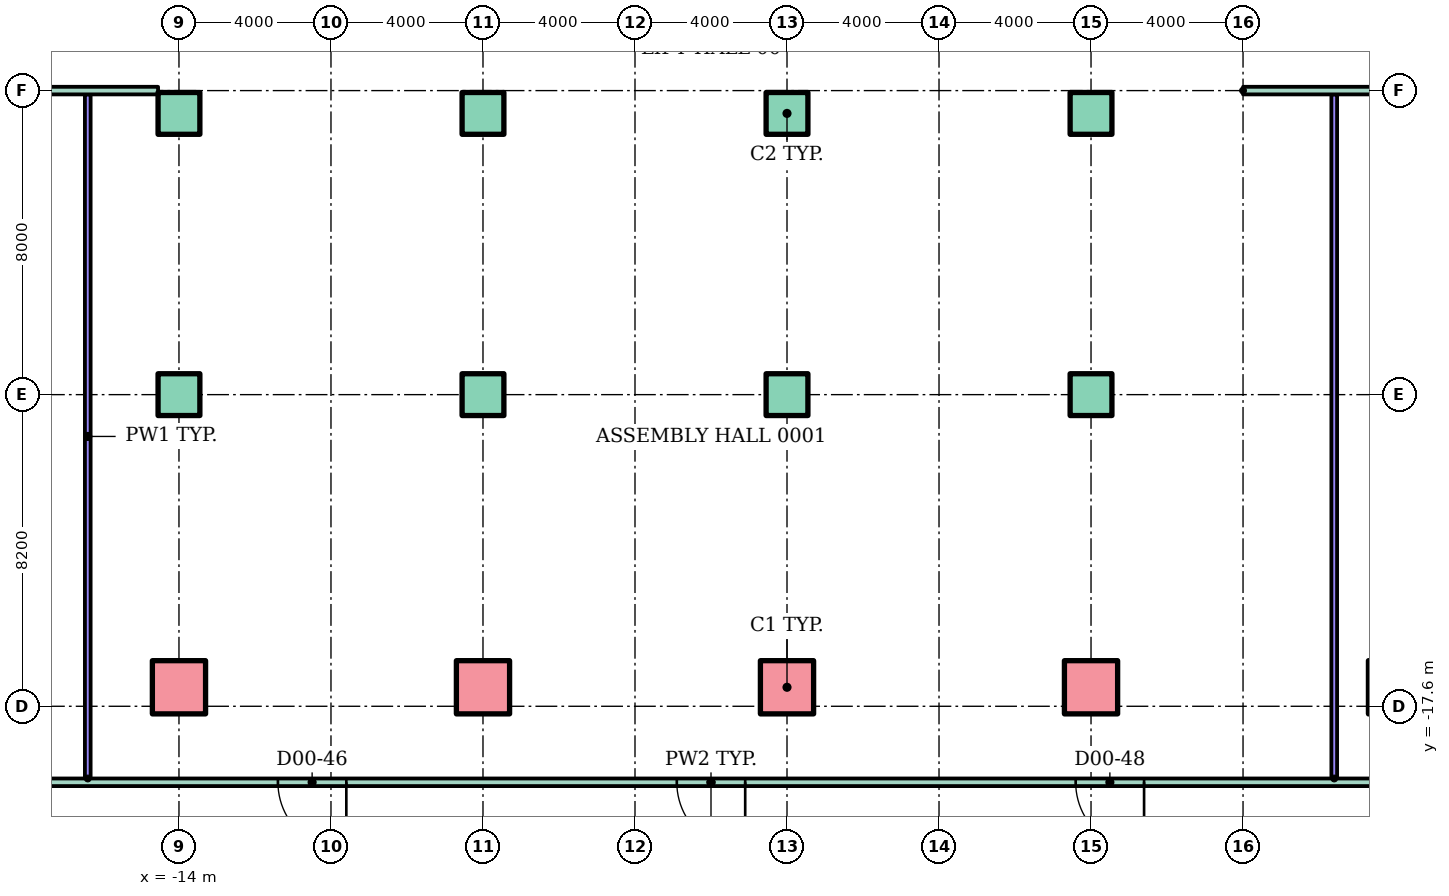
"""IFC4 building model, lengths in metres.
Left out: names, types, materials, properties, quantities, classifications, styles, units other than length and angle.
Written with IfcOpenShell. Run it as: python <this file> out.ifc"""

import sys

from ifc_helpers import new_model, si_unit, direction, frame, frame_2d, origin, origin_2d, place, context, subcontext, project, spatial, rectangle, hollow_rectangle, extrude, element, fill, save


model = new_model("IFC4")
c1 = context("Model", 3, precision=1e-05, world=origin(), true_north=direction((0.0, 1.0)))
c2 = subcontext(c1, "Body", "Model", "MODEL_VIEW")
j1 = project(units=[si_unit("LENGTHUNIT", "METRE"), si_unit("PLANEANGLEUNIT", "RADIAN")], contexts=[c1])
p1 = place(None, origin())
s1 = spatial("IfcSite", under=j1, at=p1, CompositionType="ELEMENT")
p2 = place(p1, origin())
s2 = spatial("IfcBuilding", under=s1, at=p2, CompositionType="ELEMENT")
p3 = place(p2, origin())
s3 = spatial("IfcBuildingStorey", under=s2, at=p3, CompositionType="ELEMENT", Elevation=0.0)
for number, where in (
    (1, (-14.0, -17.1, 0.0)),
    (2, (-6.0, -17.1, 0.0)),
    (3, (2.0, -17.1, 0.0)),
    (4, (10.0, -17.1, 0.0)),
    (5, (18.0, -17.1, 0.0)),
):
    element("IfcColumn", number, at=place(p3, frame(where)), inside=s3, PredefinedType="COLUMN", context=c2, shape_type="SweptSolid", body=[
        extrude(hollow_rectangle(XDim=1.4, YDim=1.4, WallThickness=0.08, at=origin_2d()), origin(), (0.0, 0.0, 1.0), 6.0),
    ])
for number, where in (
    (6, (-14.0, -9.4, 0.0)),
    (7, (-6.0, -9.4, 0.0)),
    (8, (2.0, -9.4, 0.0)),
    (9, (10.0, -9.4, 0.0)),
    (10, (-14.0, -2.0, 0.0)),
    (11, (-6.0, -2.0, 0.0)),
    (12, (2.0, -2.0, 0.0)),
    (13, (10.0, -2.0, 0.0)),
):
    element("IfcColumn", number, at=place(p3, frame(where)), inside=s3, PredefinedType="COLUMN", context=c2, shape_type="SweptSolid", body=[
        extrude(rectangle(XDim=1.1, YDim=1.1, at=origin_2d()), origin(), (0.0, 0.0, 1.0), 6.0),
    ])
p4 = place(p3, frame((-37.6, -19.6, 0.0)))
e14 = element("IfcWall", 14, at=p4, inside=s3, PredefinedType="PARTITIONING", context=c2, shape_type="SweptSolid", body=[
    extrude(rectangle(XDim=75.2, YDim=0.2, at=frame_2d((37.6, 0.0))), origin(), (0.0, 0.0, 1.0), 5.7),
])
p5 = place(p4, frame((26.204, 0.0, 0.0)))
e15 = element("IfcOpeningElement", 15, at=p5, cuts=e14, PredefinedType="OPENING", context=c2, shape_type="SweptSolid", body=[
    extrude(rectangle(XDim=1.8, YDim=2.1, at=frame_2d((0.9, 1.05))), frame((0.0, 0.11, 0.0), z_axis=(0.0, -1.0, 0.0), x_axis=(1.0, 0.0, 0.0)), (0.0, 0.0, 1.0), 0.22),
])
p6 = place(p4, frame((36.7, 0.0, 0.0)))
e16 = element("IfcOpeningElement", 16, at=p6, cuts=e14, PredefinedType="OPENING", context=c2, shape_type="SweptSolid", body=[
    extrude(rectangle(XDim=1.8, YDim=2.1, at=frame_2d((0.9, 1.05))), frame((0.0, 0.11, 0.0), z_axis=(0.0, -1.0, 0.0), x_axis=(1.0, 0.0, 0.0)), (0.0, 0.0, 1.0), 0.22),
])
p7 = place(p4, frame((47.196, 0.0, 0.0)))
e17 = element("IfcOpeningElement", 17, at=p7, cuts=e14, PredefinedType="OPENING", context=c2, shape_type="SweptSolid", body=[
    extrude(rectangle(XDim=1.8, YDim=2.1, at=frame_2d((0.9, 1.05))), frame((0.0, 0.11, 0.0), z_axis=(0.0, -1.0, 0.0), x_axis=(1.0, 0.0, 0.0)), (0.0, 0.0, 1.0), 0.22),
])
p8 = place(p3, frame((-21.45, -1.4, 0.0)))
e18 = element("IfcWall", 18, at=p8, inside=s3, PredefinedType="PARTITIONING", context=c2, shape_type="SweptSolid", body=[
    extrude(rectangle(XDim=6.9, YDim=0.2, at=frame_2d((3.45, 0.0))), origin(), (0.0, 0.0, 1.0), 5.7),
])
p9 = place(p3, frame((14.0, -1.4, 0.0)))
e19 = element("IfcWall", 19, at=p9, inside=s3, PredefinedType="PARTITIONING", context=c2, shape_type="SweptSolid", body=[
    extrude(rectangle(XDim=3.45, YDim=0.2, at=frame_2d((1.725, 0.0))), origin(), (0.0, 0.0, 1.0), 5.7),
])
for number, where, z_axis, x_axis in (
    (20, (-16.4, -19.5, 0.0), (0.0, 0.0, 1.0), (0.0, 1.0, 0.0)),
    (21, (16.4, -19.5, 0.0), (0.0, 0.0, 1.0), (0.0, 1.0, 0.0)),
):
    element("IfcWall", number, at=place(p3, frame(where, z_axis=z_axis, x_axis=x_axis)), inside=s3, PredefinedType="PARTITIONING", context=c2, shape_type="SweptSolid", body=[
        extrude(rectangle(XDim=18.0, YDim=0.15, at=frame_2d((9.0, 0.0))), origin(), (0.0, 0.0, 1.0), 5.7),
    ])
p10 = place(p5, frame((1.8, 0.0, 0.0), z_axis=(0.0, 0.0, 1.0), x_axis=(-1.0, 0.0, 0.0)))
e22 = element("IfcDoor", 22, at=p10, inside=s3, OperationType="DOUBLE_DOOR_SINGLE_SWING", PredefinedType="DOOR", context=c2, shape_type="SweptSolid", body=[
    extrude(rectangle(XDim=1.8, YDim=2.1, at=frame_2d((0.9, 1.05))), frame((0.0, 0.025, 0.0), z_axis=(0.0, -1.0, 0.0), x_axis=(1.0, 0.0, 0.0)), (0.0, 0.0, 1.0), 0.05),
])
fill(e15, e22)
p11 = place(p6, frame((1.8, 0.0, 0.0), z_axis=(0.0, 0.0, 1.0), x_axis=(-1.0, 0.0, 0.0)))
e23 = element("IfcDoor", 23, at=p11, inside=s3, OperationType="DOUBLE_DOOR_SINGLE_SWING", PredefinedType="DOOR", context=c2, shape_type="SweptSolid", body=[
    extrude(rectangle(XDim=1.8, YDim=2.1, at=frame_2d((0.9, 1.05))), frame((0.0, 0.025, 0.0), z_axis=(0.0, -1.0, 0.0), x_axis=(1.0, 0.0, 0.0)), (0.0, 0.0, 1.0), 0.05),
])
fill(e16, e23)
p12 = place(p7, frame((1.8, 0.0, 0.0), z_axis=(0.0, 0.0, 1.0), x_axis=(-1.0, 0.0, 0.0)))
e24 = element("IfcDoor", 24, at=p12, inside=s3, OperationType="DOUBLE_DOOR_SINGLE_SWING", PredefinedType="DOOR", context=c2, shape_type="SweptSolid", body=[
    extrude(rectangle(XDim=1.8, YDim=2.1, at=frame_2d((0.9, 1.05))), frame((0.0, 0.025, 0.0), z_axis=(0.0, -1.0, 0.0), x_axis=(1.0, 0.0, 0.0)), (0.0, 0.0, 1.0), 0.05),
])
fill(e17, e24)
save(model, sys.argv[1])
